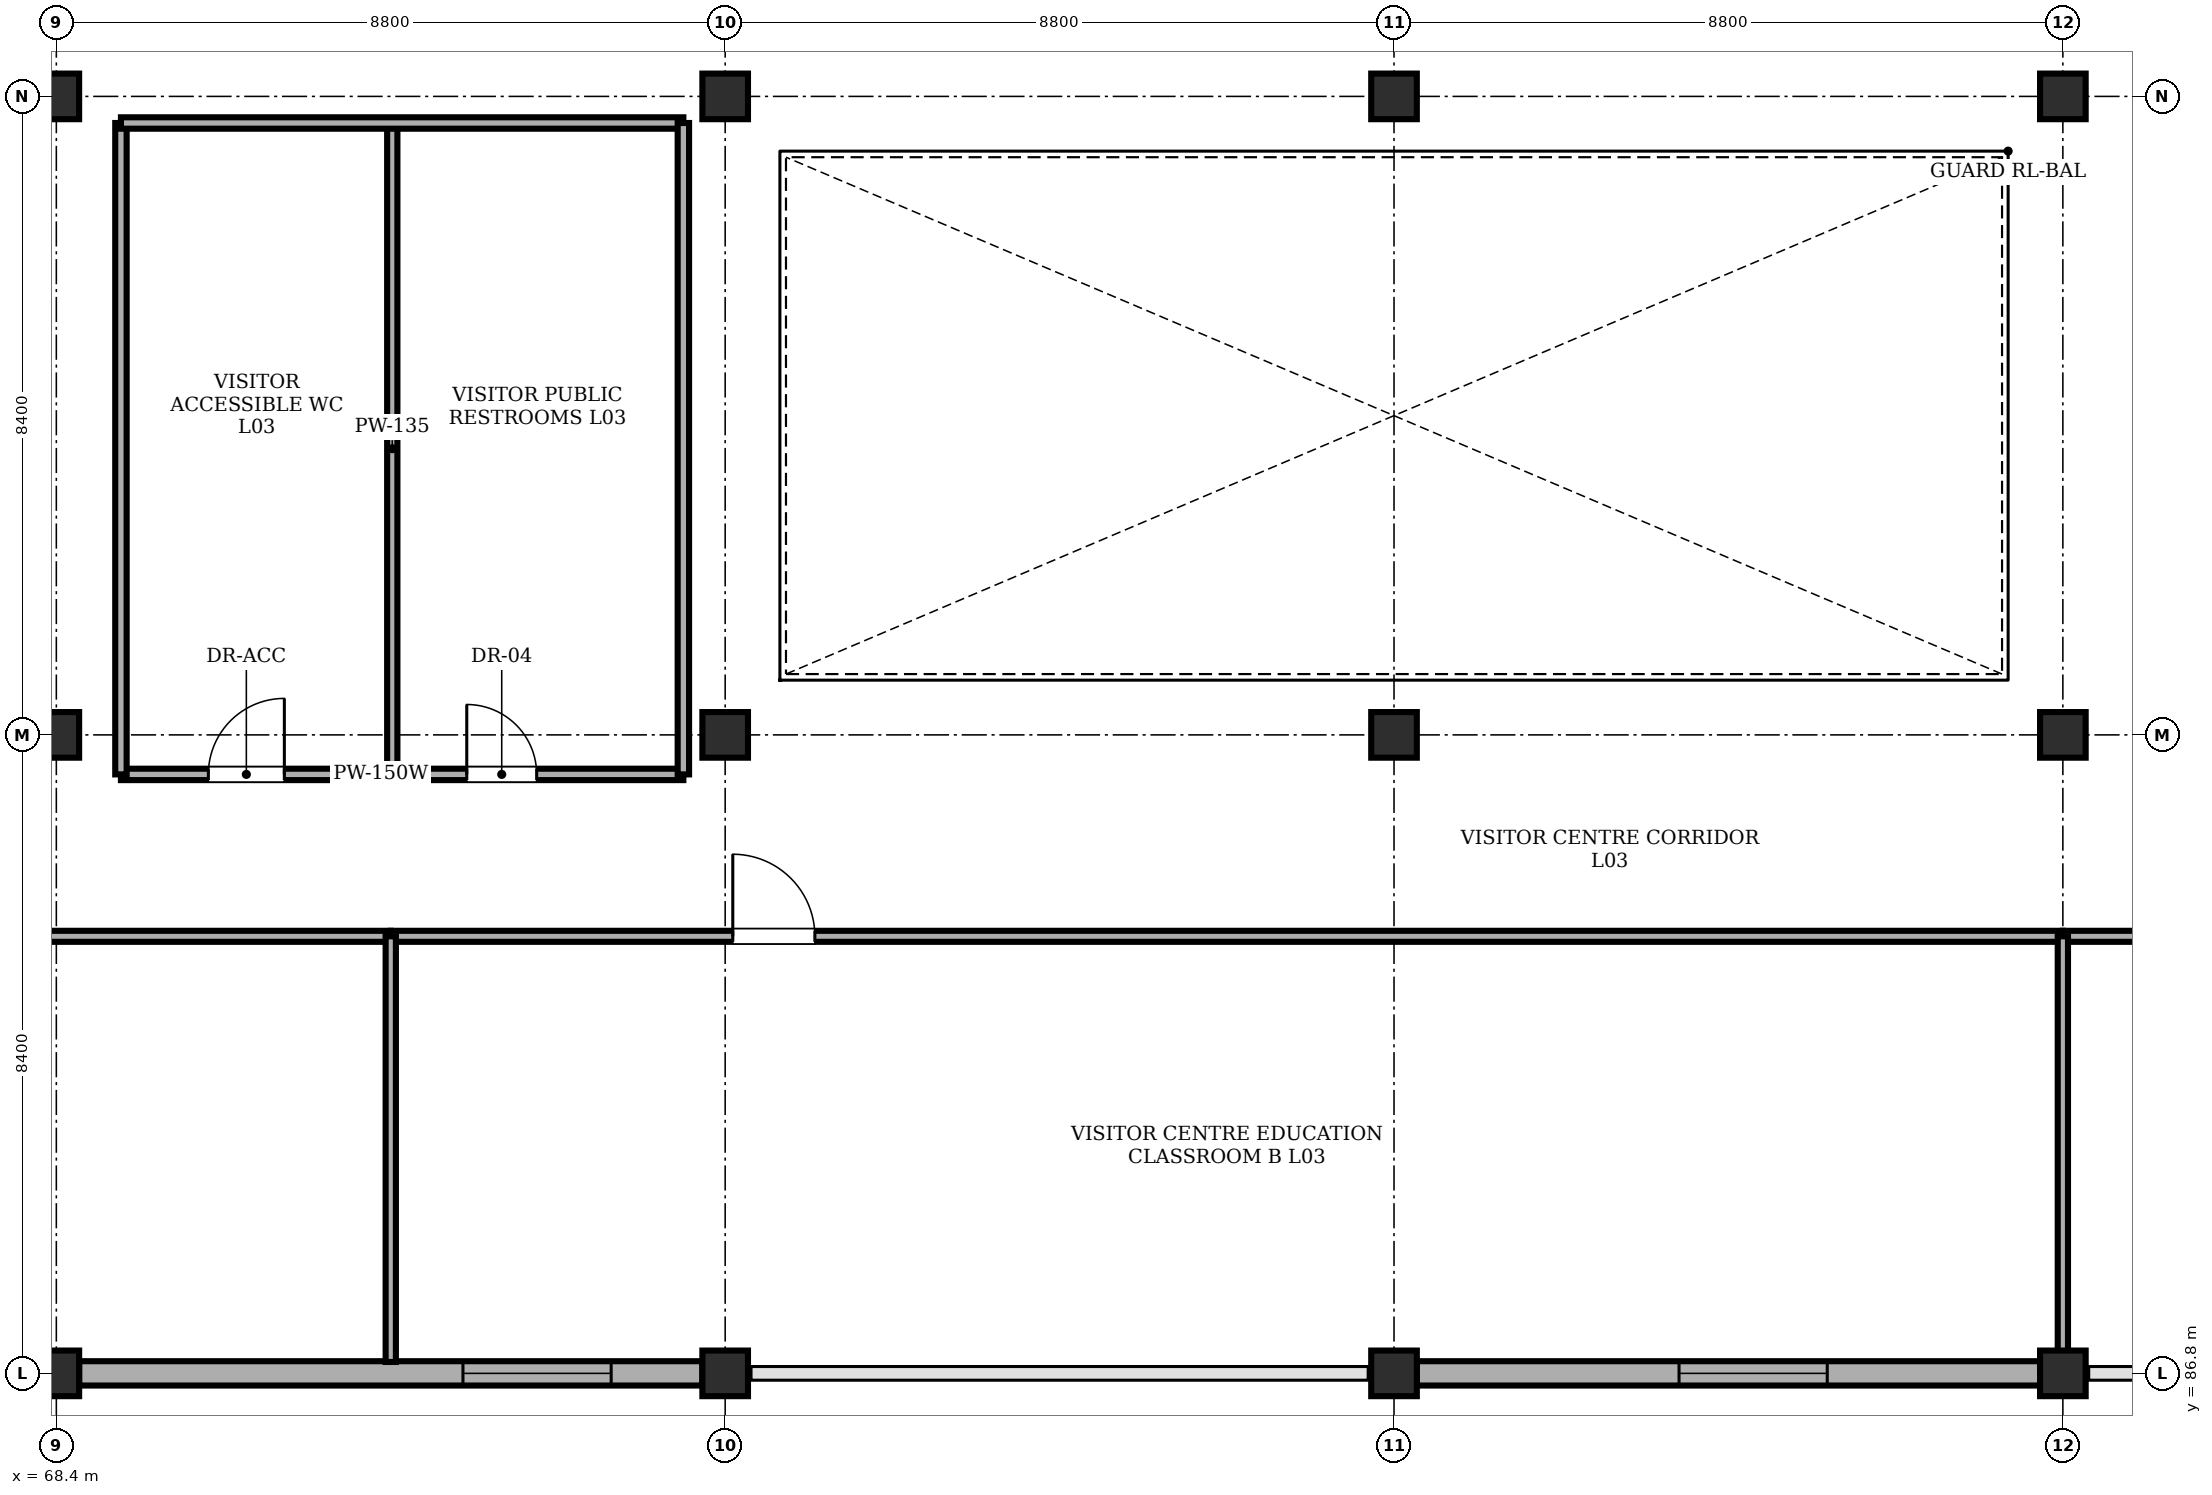
"""IFC4 building model, lengths in metres.
Left out: names, types, materials, properties, quantities, classifications, styles, units other than length and angle.
Written with IfcOpenShell. Run it as: python <this file> out.ifc"""

import sys

from ifc_helpers import new_model, si_unit, direction, frame, frame_2d, origin, origin_2d, place, context, subcontext, project, spatial, rectangle, extrude, element, fill, save


model = new_model("IFC4")
c1 = context("Model", 3, precision=1e-05, world=origin(), true_north=direction((0.0, 1.0)))
c2 = subcontext(c1, "Body", "Model", "MODEL_VIEW")
j1 = project(units=[si_unit("LENGTHUNIT", "METRE"), si_unit("PLANEANGLEUNIT", "RADIAN")], contexts=[c1])
p1 = place(None, origin())
s1 = spatial("IfcSite", under=j1, at=p1, CompositionType="ELEMENT")
p2 = place(p1, origin())
s2 = spatial("IfcBuilding", under=s1, at=p2, CompositionType="ELEMENT")
p3 = place(p2, frame((0.0, 0.0, 10.2)))
s3 = spatial("IfcBuildingStorey", under=s2, at=p3, CompositionType="ELEMENT", Elevation=10.2)
for number, where, z_axis, x_axis in (
    (1, (68.4, 86.8, 0.0), (0.0, 0.0, 1.0), (1.0, 0.0, 0.0)),
    (2, (68.4, 95.2, 0.0), (0.0, 0.0, 1.0), (1.0, 0.0, 0.0)),
    (3, (68.4, 103.6, 0.0), (0.0, 0.0, 1.0), (1.0, 0.0, 0.0)),
    (4, (77.2, 86.8, 0.0), (0.0, 0.0, 1.0), (1.0, 0.0, 0.0)),
    (5, (77.2, 95.2, 0.0), (0.0, 0.0, 1.0), (1.0, 0.0, 0.0)),
    (6, (77.2, 103.6, 0.0), (0.0, 0.0, 1.0), (1.0, 0.0, 0.0)),
    (7, (86.0, 86.8, 0.0), (0.0, 0.0, 1.0), (1.0, 0.0, 0.0)),
    (8, (86.0, 95.2, 0.0), (0.0, 0.0, 1.0), (1.0, 0.0, 0.0)),
    (9, (86.0, 103.6, 0.0), (0.0, 0.0, 1.0), (1.0, 0.0, 0.0)),
    (10, (94.8, 86.8, 0.0), (0.0, 0.0, 1.0), (1.0, 0.0, 0.0)),
    (11, (94.8, 95.2, 0.0), (0.0, 0.0, 1.0), (1.0, 0.0, 0.0)),
    (12, (94.8, 103.6, 0.0), (0.0, 0.0, 1.0), (1.0, 0.0, 0.0)),
):
    element("IfcColumn", number, at=place(p3, frame(where, z_axis=z_axis, x_axis=x_axis)), inside=s3, PredefinedType="COLUMN", context=c2, shape_type="SweptSolid", body=[
        extrude(rectangle(XDim=0.6, YDim=0.6, at=origin_2d()), origin(), (0.0, 0.0, 1.0), 4.26),
    ])
p4 = place(p3, frame((76.9, 86.8, 0.0), z_axis=(0.0, 0.0, 1.0), x_axis=(-1.0, 0.0, 0.0)))
e13 = element("IfcWall", 13, at=p4, inside=s3, PredefinedType="STANDARD", context=c2, shape_type="SweptSolid", body=[
    extrude(rectangle(XDim=8.2, YDim=0.32, at=frame_2d((4.1, 0.0))), origin(), (0.0, 0.0, 1.0), 3.61),
])
p5 = place(p4, frame((1.2, 0.0, 0.95)))
e14 = element("IfcOpeningElement", 14, at=p5, cuts=e13, PredefinedType="OPENING", context=c2, shape_type="SweptSolid", body=[
    extrude(rectangle(XDim=1.95, YDim=2.15, at=frame_2d((0.975, 1.075))), frame((0.0, 0.17, 0.0), z_axis=(0.0, -1.0, 0.0), x_axis=(1.0, 0.0, 0.0)), (0.0, 0.0, 1.0), 0.34),
])
p6 = place(p3, frame((94.5, 86.8, 0.0), z_axis=(0.0, 0.0, 1.0), x_axis=(-1.0, 0.0, 0.0)))
e15 = element("IfcWall", 15, at=p6, inside=s3, PredefinedType="STANDARD", context=c2, shape_type="SweptSolid", body=[
    extrude(rectangle(XDim=8.2, YDim=0.32, at=frame_2d((4.1, 0.0))), origin(), (0.0, 0.0, 1.0), 3.61),
])
p7 = place(p6, frame((2.8, 0.0, 0.95)))
e16 = element("IfcOpeningElement", 16, at=p7, cuts=e15, PredefinedType="OPENING", context=c2, shape_type="SweptSolid", body=[
    extrude(rectangle(XDim=1.95, YDim=2.15, at=frame_2d((0.975, 1.075))), frame((0.0, 0.17, 0.0), z_axis=(0.0, -1.0, 0.0), x_axis=(1.0, 0.0, 0.0)), (0.0, 0.0, 1.0), 0.34),
])
p8 = place(p3, frame((69.25, 94.68, 0.0), z_axis=(0.0, 0.0, 1.0), x_axis=(1.0, 0.0, 0.0)))
e17 = element("IfcWall", 17, at=p8, inside=s3, PredefinedType="PARTITIONING", context=c2, shape_type="SweptSolid", body=[
    extrude(rectangle(XDim=7.4, YDim=0.15, at=frame_2d((3.7, 0.0))), origin(), (0.0, 0.0, 1.0), 4.26),
])
p9 = place(p8, frame((1.15, 0.0, 0.0)))
e18 = element("IfcOpeningElement", 18, at=p9, cuts=e17, PredefinedType="OPENING", context=c2, shape_type="SweptSolid", body=[
    extrude(rectangle(XDim=1.0, YDim=2.12, at=frame_2d((0.5, 1.06))), frame((0.0, 0.085, 0.0), z_axis=(0.0, -1.0, 0.0), x_axis=(1.0, 0.0, 0.0)), (0.0, 0.0, 1.0), 0.17),
])
p10 = place(p8, frame((4.55, 0.0, 0.0)))
e19 = element("IfcOpeningElement", 19, at=p10, cuts=e17, PredefinedType="OPENING", context=c2, shape_type="SweptSolid", body=[
    extrude(rectangle(XDim=0.92, YDim=2.1, at=frame_2d((0.46, 1.05))), frame((0.0, 0.085, 0.0), z_axis=(0.0, -1.0, 0.0), x_axis=(1.0, 0.0, 0.0)), (0.0, 0.0, 1.0), 0.17),
])
p11 = place(p3, frame((69.25, 94.68, 0.0), z_axis=(0.0, 0.0, 1.0), x_axis=(0.0, 1.0, 0.0)))
e20 = element("IfcWall", 20, at=p11, inside=s3, PredefinedType="PARTITIONING", context=c2, shape_type="SweptSolid", body=[
    extrude(rectangle(XDim=8.57, YDim=0.15, at=frame_2d((4.285, 0.0))), origin(), (0.0, 0.0, 1.0), 4.26),
])
p12 = place(p3, frame((72.82, 94.68, 0.0), z_axis=(0.0, 0.0, 1.0), x_axis=(0.0, 1.0, 0.0)))
e21 = element("IfcWall", 21, at=p12, inside=s3, PredefinedType="PARTITIONING", context=c2, shape_type="SweptSolid", body=[
    extrude(rectangle(XDim=8.57, YDim=0.135, at=frame_2d((4.285, 0.0))), origin(), (0.0, 0.0, 1.0), 3.76),
])
p13 = place(p3, frame((69.25, 103.25, 0.0), z_axis=(0.0, 0.0, 1.0), x_axis=(1.0, 0.0, 0.0)))
e22 = element("IfcWall", 22, at=p13, inside=s3, PredefinedType="PARTITIONING", context=c2, shape_type="SweptSolid", body=[
    extrude(rectangle(XDim=7.4, YDim=0.15, at=frame_2d((3.7, 0.0))), origin(), (0.0, 0.0, 1.0), 4.26),
])
p14 = place(p3, frame((76.65, 94.68, 0.0), z_axis=(0.0, 0.0, 1.0), x_axis=(0.0, 1.0, 0.0)))
e23 = element("IfcWall", 23, at=p14, inside=s3, PredefinedType="PARTITIONING", context=c2, shape_type="SweptSolid", body=[
    extrude(rectangle(XDim=8.57, YDim=0.15, at=frame_2d((4.285, 0.0))), origin(), (0.0, 0.0, 1.0), 4.26),
])
p15 = place(p3, frame((50.92, 92.55, 0.0), z_axis=(0.0, 0.0, 1.0), x_axis=(1.0, 0.0, 0.0)))
e24 = element("IfcWall", 24, at=p15, inside=s3, PredefinedType="PARTITIONING", context=c2, shape_type="SweptSolid", body=[
    extrude(rectangle(XDim=21.88, YDim=0.145, at=frame_2d((10.94, 0.0))), origin(), (0.0, 0.0, 1.0), 4.26),
])
p16 = place(p15, frame((4.5, 0.0, 0.0)))
e25 = element("IfcOpeningElement", 25, at=p16, cuts=e24, PredefinedType="OPENING", context=c2, shape_type="SweptSolid", body=[
    extrude(rectangle(XDim=1.08, YDim=2.15, at=frame_2d((0.54, 1.075))), frame((0.0, 0.083, 0.0), z_axis=(0.0, -1.0, 0.0), x_axis=(1.0, 0.0, 0.0)), (0.0, 0.0, 1.0), 0.165),
])
p17 = place(p3, frame((72.8, 92.55, 0.0), z_axis=(0.0, 0.0, 1.0), x_axis=(1.0, 0.0, 0.0)))
e26 = element("IfcWall", 26, at=p17, inside=s3, PredefinedType="PARTITIONING", context=c2, shape_type="SweptSolid", body=[
    extrude(rectangle(XDim=22.0, YDim=0.145, at=frame_2d((11.0, 0.0))), origin(), (0.0, 0.0, 1.0), 4.26),
])
p18 = place(p17, frame((4.5, 0.0, 0.0)))
e27 = element("IfcOpeningElement", 27, at=p18, cuts=e26, PredefinedType="OPENING", context=c2, shape_type="SweptSolid", body=[
    extrude(rectangle(XDim=1.08, YDim=2.15, at=frame_2d((0.54, 1.075))), frame((0.0, 0.083, 0.0), z_axis=(0.0, -1.0, 0.0), x_axis=(1.0, 0.0, 0.0)), (0.0, 0.0, 1.0), 0.165),
])
p19 = place(p3, frame((72.8, 86.95, 0.0), z_axis=(0.0, 0.0, 1.0), x_axis=(0.0, 1.0, 0.0)))
e28 = element("IfcWall", 28, at=p19, inside=s3, PredefinedType="PARTITIONING", context=c2, shape_type="SweptSolid", body=[
    extrude(rectangle(XDim=5.6, YDim=0.135, at=frame_2d((2.8, 0.0))), origin(), (0.0, 0.0, 1.0), 3.76),
])
p20 = place(p3, frame((94.8, 92.55, 0.0), z_axis=(0.0, 0.0, 1.0), x_axis=(1.0, 0.0, 0.0)))
e29 = element("IfcWall", 29, at=p20, inside=s3, PredefinedType="PARTITIONING", context=c2, shape_type="SweptSolid", body=[
    extrude(rectangle(XDim=26.22, YDim=0.145, at=frame_2d((13.11, 0.0))), origin(), (0.0, 0.0, 1.0), 4.26),
])
p21 = place(p20, frame((4.5, 0.0, 0.0)))
e30 = element("IfcOpeningElement", 30, at=p21, cuts=e29, PredefinedType="OPENING", context=c2, shape_type="SweptSolid", body=[
    extrude(rectangle(XDim=1.7, YDim=2.2, at=frame_2d((0.85, 1.1))), frame((0.0, 0.083, 0.0), z_axis=(0.0, -1.0, 0.0), x_axis=(1.0, 0.0, 0.0)), (0.0, 0.0, 1.0), 0.165),
])
p22 = place(p3, frame((94.8, 86.95, 0.0), z_axis=(0.0, 0.0, 1.0), x_axis=(0.0, 1.0, 0.0)))
e31 = element("IfcWall", 31, at=p22, inside=s3, PredefinedType="PARTITIONING", context=c2, shape_type="SweptSolid", body=[
    extrude(rectangle(XDim=5.6, YDim=0.135, at=frame_2d((2.8, 0.0))), origin(), (0.0, 0.0, 1.0), 3.61),
])
p23 = place(p5, origin())
e32 = element("IfcWindow", 32, at=p23, inside=s3, PartitioningType="DOUBLE_PANEL_VERTICAL", PredefinedType="WINDOW", context=c2, shape_type="SweptSolid", body=[
    extrude(rectangle(XDim=1.95, YDim=2.15, at=frame_2d((0.975, 1.075))), frame((0.0, 0.03, 0.0), z_axis=(0.0, -1.0, 0.0), x_axis=(1.0, 0.0, 0.0)), (0.0, 0.0, 1.0), 0.06),
])
fill(e14, e32)
p24 = place(p7, origin())
e33 = element("IfcWindow", 33, at=p24, inside=s3, PartitioningType="DOUBLE_PANEL_VERTICAL", PredefinedType="WINDOW", context=c2, shape_type="SweptSolid", body=[
    extrude(rectangle(XDim=1.95, YDim=2.15, at=frame_2d((0.975, 1.075))), frame((0.0, 0.03, 0.0), z_axis=(0.0, -1.0, 0.0), x_axis=(1.0, 0.0, 0.0)), (0.0, 0.0, 1.0), 0.06),
])
fill(e16, e33)
p25 = place(p9, origin())
e34 = element("IfcDoor", 34, at=p25, inside=s3, OperationType="SINGLE_SWING_RIGHT", PredefinedType="DOOR", context=c2, shape_type="SweptSolid", body=[
    extrude(rectangle(XDim=1.0, YDim=2.12, at=frame_2d((0.5, 1.06))), frame((0.0, 0.025, 0.0), z_axis=(0.0, -1.0, 0.0), x_axis=(1.0, 0.0, 0.0)), (0.0, 0.0, 1.0), 0.05),
])
fill(e18, e34)
p26 = place(p10, origin())
e35 = element("IfcDoor", 35, at=p26, inside=s3, OperationType="SINGLE_SWING_LEFT", PredefinedType="DOOR", context=c2, shape_type="SweptSolid", body=[
    extrude(rectangle(XDim=0.92, YDim=2.1, at=frame_2d((0.46, 1.05))), frame((0.0, 0.025, 0.0), z_axis=(0.0, -1.0, 0.0), x_axis=(1.0, 0.0, 0.0)), (0.0, 0.0, 1.0), 0.05),
])
fill(e19, e35)
p27 = place(p18, origin())
e36 = element("IfcDoor", 36, at=p27, inside=s3, OperationType="SINGLE_SWING_LEFT", PredefinedType="DOOR", context=c2, shape_type="SweptSolid", body=[
    extrude(rectangle(XDim=1.08, YDim=2.15, at=frame_2d((0.54, 1.075))), frame((0.0, 0.025, 0.0), z_axis=(0.0, -1.0, 0.0), x_axis=(1.0, 0.0, 0.0)), (0.0, 0.0, 1.0), 0.05),
])
fill(e27, e36)
save(model, sys.argv[1])
